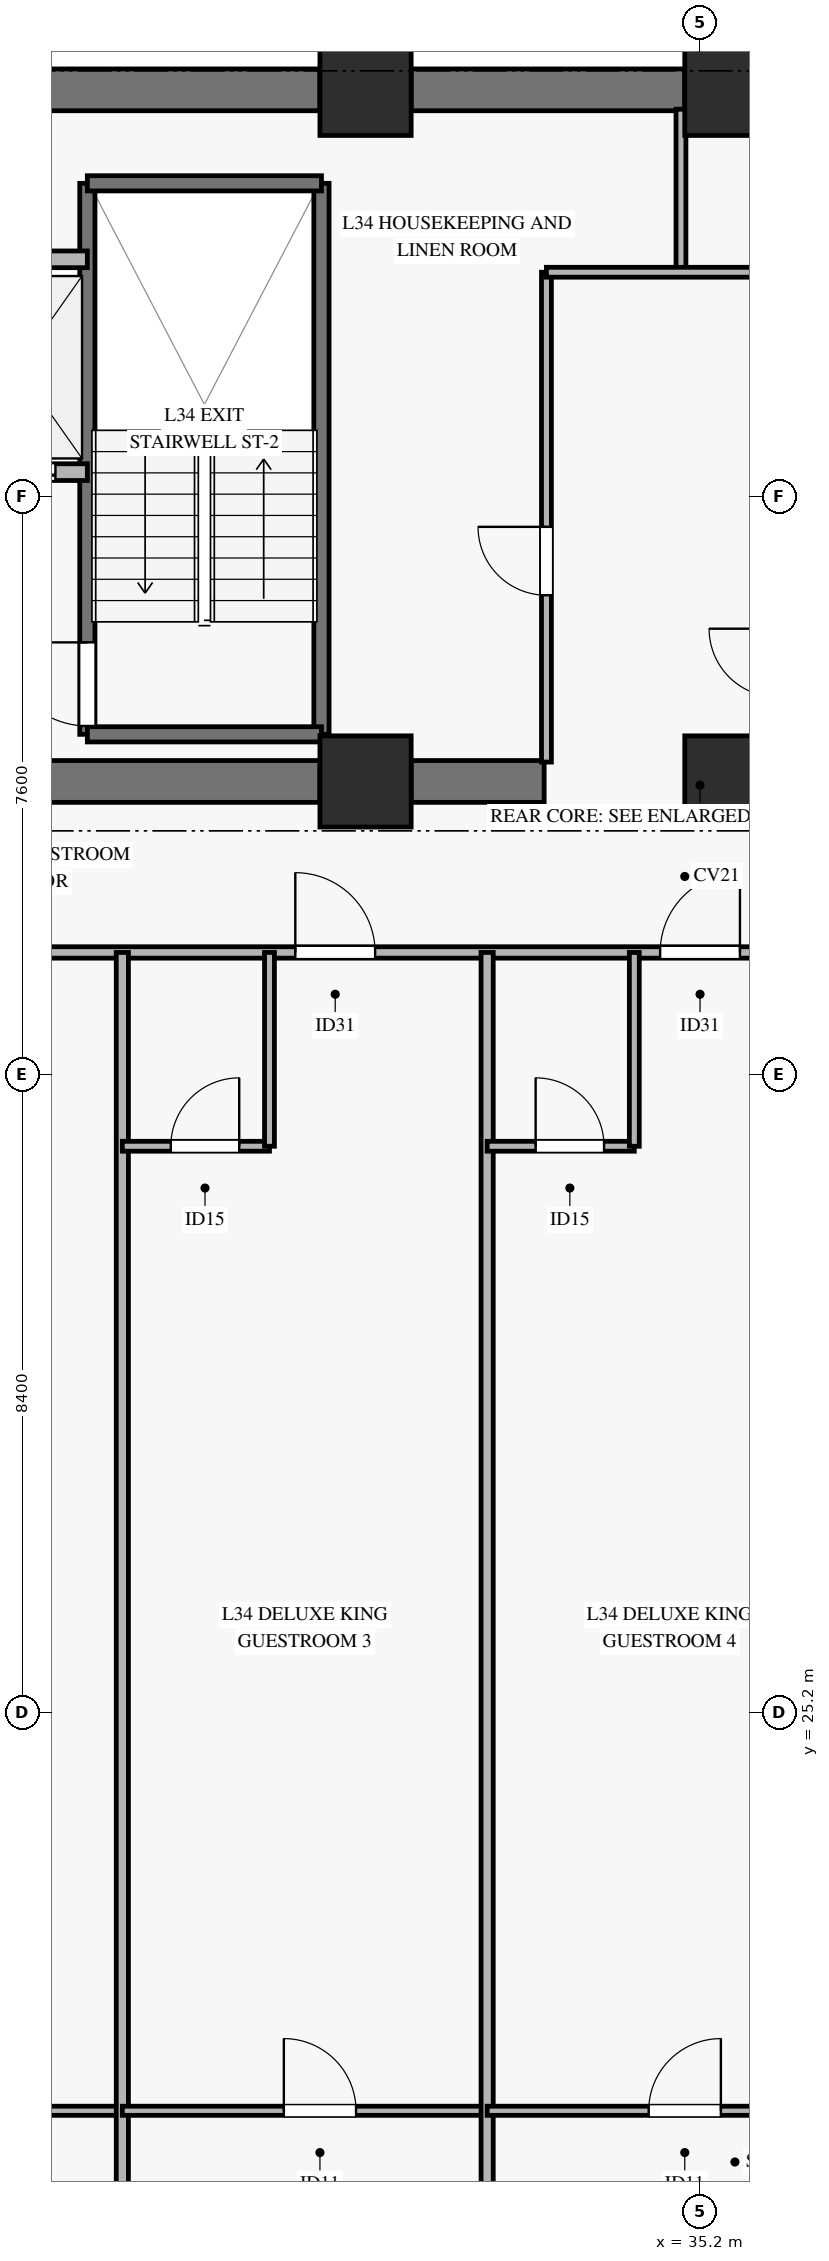
"""IFC4 building model, lengths in metres.
Left out: names, types, materials, properties, quantities, classifications, styles, units other than length and angle.
Written with IfcOpenShell. Run it as: python <this file> out.ifc"""

import sys

from ifc_helpers import new_model, si_unit, direction, frame, frame_2d, origin, origin_2d, place, context, subcontext, project, spatial, rectangle, extrude, source, transform, mapped, element, fill, save


model = new_model("IFC4")
c1 = context("Model", 3, precision=1e-05, world=origin(), true_north=direction((0.0, 1.0)))
c2 = subcontext(c1, "Body", "Model", "MODEL_VIEW")
j1 = project(units=[si_unit("LENGTHUNIT", "METRE"), si_unit("PLANEANGLEUNIT", "RADIAN")], contexts=[c1])
p1 = place(None, origin())
s1 = spatial("IfcSite", under=j1, at=p1, CompositionType="ELEMENT")
p2 = place(p1, origin())
s2 = spatial("IfcBuilding", under=s1, at=p2, CompositionType="ELEMENT")
p3 = place(p2, frame((0.0, 0.0, 141.2)))
s3 = spatial("IfcBuildingStorey", under=s2, at=p3, CompositionType="ELEMENT", Elevation=141.2)
m1 = source(origin(), c2, "Body", "SweptSolid", [
    extrude(rectangle(XDim=1.2, YDim=1.2, at=origin_2d()), origin(), (0.0, 0.0, 1.0), 3.22),
])
for number, where, z_axis, x_axis in (
    (1, (30.8, 37.45, 0.0), (0.0, 0.0, 1.0), (1.0, 0.0, 0.0)),
    (2, (30.8, 46.55, 0.0), (0.0, 0.0, 1.0), (1.0, 0.0, 0.0)),
    (3, (35.6, 37.45, 0.0), (0.0, 0.0, 1.0), (1.0, 0.0, 0.0)),
    (4, (35.6, 46.55, 0.0), (0.0, 0.0, 1.0), (1.0, 0.0, 0.0)),
):
    element("IfcColumn", number, at=place(p3, frame(where, z_axis=z_axis, x_axis=x_axis)), inside=s3, PredefinedType="PILASTER", context=c2, shape_type="MappedRepresentation", body=[
        mapped(m1, transform((0.0, 0.0, 0.0), x_axis=(1.0, 0.0, 0.0), y_axis=(0.0, 1.0, 0.0), z_axis=(0.0, 0.0, 1.0), scale=1.0)),
    ])
p4 = place(p3, frame((20.45, 46.55, 0.0), z_axis=(0.0, 0.0, 1.0), x_axis=(1.0, 0.0, 0.0)))
e5 = element("IfcWall", 5, at=p4, inside=s3, PredefinedType="SHEAR", context=c2, shape_type="SweptSolid", body=[
    extrude(rectangle(XDim=9.75, YDim=0.55, at=frame_2d((4.875, 0.0))), origin(), (0.0, 0.0, 1.0), 3.22),
])
p5 = place(p3, frame((31.4, 46.55, 0.0), z_axis=(0.0, 0.0, 1.0), x_axis=(1.0, 0.0, 0.0)))
e6 = element("IfcWall", 6, at=p5, inside=s3, PredefinedType="SHEAR", context=c2, shape_type="SweptSolid", body=[
    extrude(rectangle(XDim=3.6, YDim=0.55, at=frame_2d((1.8, 0.0))), origin(), (0.0, 0.0, 1.0), 3.22),
])
p6 = place(p3, frame((20.45, 37.45, 0.0), z_axis=(0.0, 0.0, 1.0), x_axis=(1.0, 0.0, 0.0)))
e7 = element("IfcWall", 7, at=p6, inside=s3, PredefinedType="SHEAR", context=c2, shape_type="SweptSolid", body=[
    extrude(rectangle(XDim=9.75, YDim=0.55, at=frame_2d((4.875, 0.0))), origin(), (0.0, 0.0, 1.0), 3.22),
])
p7 = place(p6, frame((4.1, 0.0, 0.0)))
e8 = element("IfcOpeningElement", 8, at=p7, cuts=e7, PredefinedType="OPENING", context=c2, shape_type="SweptSolid", body=[
    extrude(rectangle(XDim=1.2, YDim=2.15, at=frame_2d((0.6, 1.075))), frame((0.0, 0.285, 0.0), z_axis=(0.0, -1.0, 0.0), x_axis=(1.0, 0.0, 0.0)), (0.0, 0.0, 1.0), 0.57),
])
p8 = place(p3, frame((31.4, 37.45, 0.0), z_axis=(0.0, 0.0, 1.0), x_axis=(1.0, 0.0, 0.0)))
e9 = element("IfcWall", 9, at=p8, inside=s3, PredefinedType="SHEAR", context=c2, shape_type="SweptSolid", body=[
    extrude(rectangle(XDim=1.75, YDim=0.55, at=frame_2d((0.875, 0.0))), origin(), (0.0, 0.0, 1.0), 3.22),
])
p9 = place(p3, frame((27.14, 38.07, 0.0), z_axis=(0.0, 0.0, 1.0), x_axis=(0.0, 1.0, 0.0)))
e10 = element("IfcWall", 10, at=p9, inside=s3, PredefinedType="SOLIDWALL", context=c2, shape_type="SweptSolid", body=[
    extrude(rectangle(XDim=7.25, YDim=0.2, at=frame_2d((3.625, 0.0))), origin(), (0.0, 0.0, 1.0), 3.5),
])
p10 = place(p9, frame((0.11, 0.0, 0.0)))
e11 = element("IfcOpeningElement", 11, at=p10, cuts=e10, PredefinedType="OPENING", context=c2, shape_type="SweptSolid", body=[
    extrude(rectangle(XDim=1.1, YDim=2.15, at=frame_2d((0.55, 1.075))), frame((0.0, 0.11, 0.0), z_axis=(0.0, -1.0, 0.0), x_axis=(1.0, 0.0, 0.0)), (0.0, 0.0, 1.0), 0.22),
])
p11 = place(p3, frame((30.22, 38.07, 0.0), z_axis=(0.0, 0.0, 1.0), x_axis=(0.0, 1.0, 0.0)))
e12 = element("IfcWall", 12, at=p11, inside=s3, PredefinedType="SOLIDWALL", context=c2, shape_type="SweptSolid", body=[
    extrude(rectangle(XDim=7.25, YDim=0.2, at=frame_2d((3.625, 0.0))), origin(), (0.0, 0.0, 1.0), 3.5),
])
for number, where, z_axis, x_axis in (
    (13, (27.14, 45.32, 0.0), (0.0, 0.0, 1.0), (1.0, 0.0, 0.0)),
    (14, (27.14, 38.07, 0.0), (0.0, 0.0, 1.0), (1.0, 0.0, 0.0)),
):
    element("IfcWall", number, at=place(p3, frame(where, z_axis=z_axis, x_axis=x_axis)), inside=s3, PredefinedType="SOLIDWALL", context=c2, shape_type="SweptSolid", body=[
        extrude(rectangle(XDim=3.08, YDim=0.2, at=frame_2d((1.54, 0.0))), origin(), (0.0, 0.0, 1.0), 3.5),
    ])
p12 = place(p3, frame((23.22, 41.52, 0.0), z_axis=(0.0, 0.0, 1.0), x_axis=(1.0, 0.0, 0.0)))
e15 = element("IfcWall", 15, at=p12, inside=s3, PredefinedType="SOLIDWALL", context=c2, shape_type="SweptSolid", body=[
    extrude(rectangle(XDim=3.92, YDim=0.22, at=frame_2d((1.96, 0.0))), origin(), (0.0, 0.0, 1.0), 3.22),
])
p13 = place(p12, frame((0.5, 0.0, 0.0)))
e16 = element("IfcOpeningElement", 16, at=p13, cuts=e15, PredefinedType="OPENING", context=c2, shape_type="SweptSolid", body=[
    extrude(rectangle(XDim=1.1, YDim=2.2, at=frame_2d((0.55, 1.1))), frame((0.0, 0.12, 0.0), z_axis=(0.0, -1.0, 0.0), x_axis=(1.0, 0.0, 0.0)), (0.0, 0.0, 1.0), 0.24),
])
p14 = place(p12, frame((2.4, 0.0, 0.0)))
e17 = element("IfcOpeningElement", 17, at=p14, cuts=e15, PredefinedType="OPENING", context=c2, shape_type="SweptSolid", body=[
    extrude(rectangle(XDim=1.1, YDim=2.2, at=frame_2d((0.55, 1.1))), frame((0.0, 0.12, 0.0), z_axis=(0.0, -1.0, 0.0), x_axis=(1.0, 0.0, 0.0)), (0.0, 0.0, 1.0), 0.24),
])
p15 = place(p3, frame((23.22, 44.32, 0.0), z_axis=(0.0, 0.0, 1.0), x_axis=(1.0, 0.0, 0.0)))
e18 = element("IfcWall", 18, at=p15, inside=s3, PredefinedType="SOLIDWALL", context=c2, shape_type="SweptSolid", body=[
    extrude(rectangle(XDim=3.92, YDim=0.22, at=frame_2d((1.96, 0.0))), origin(), (0.0, 0.0, 1.0), 3.22),
])
p16 = place(p3, frame((33.18, 37.705, 0.0), z_axis=(0.0, 0.0, 1.0), x_axis=(0.0, 1.0, 0.0)))
e19 = element("IfcWall", 19, at=p16, inside=s3, PredefinedType="PARTITIONING", context=c2, shape_type="SweptSolid", body=[
    extrude(rectangle(XDim=6.445, YDim=0.13, at=frame_2d((3.222, 0.0))), origin(), (0.0, 0.0, 1.0), 2.22),
])
p17 = place(p16, frame((2.195, 0.0, 0.0)))
e20 = element("IfcOpeningElement", 20, at=p17, cuts=e19, PredefinedType="OPENING", context=c2, shape_type="SweptSolid", body=[
    extrude(rectangle(XDim=0.9, YDim=2.1, at=frame_2d((0.45, 1.05))), frame((0.0, 0.075, 0.0), z_axis=(0.0, -1.0, 0.0), x_axis=(1.0, 0.0, 0.0)), (0.0, 0.0, 1.0), 0.15),
])
p18 = place(p3, frame((34.95, 44.15, 0.0), z_axis=(0.0, 0.0, 1.0), x_axis=(0.0, 1.0, 0.0)))
e21 = element("IfcWall", 21, at=p18, inside=s3, PredefinedType="PARTITIONING", context=c2, shape_type="SweptSolid", body=[
    extrude(rectangle(XDim=2.145, YDim=0.13, at=frame_2d((1.073, 0.0))), origin(), (0.0, 0.0, 1.0), 3.22),
])
p19 = place(p3, frame((33.18, 44.15, 0.0), z_axis=(0.0, 0.0, 1.0), x_axis=(1.0, 0.0, 0.0)))
e22 = element("IfcWall", 22, at=p19, inside=s3, PredefinedType="PARTITIONING", context=c2, shape_type="SweptSolid", body=[
    extrude(rectangle(XDim=2.97, YDim=0.13, at=frame_2d((1.485, 0.0))), origin(), (0.0, 0.0, 1.0), 2.505),
])
p20 = place(p3, frame((5.214, 35.2, 0.0), z_axis=(0.0, 0.0, 1.0), x_axis=(1.0, 0.0, 0.0)))
e23 = element("IfcWall", 23, at=p20, inside=s3, PredefinedType="PARTITIONING", context=c2, shape_type="SweptSolid", body=[
    extrude(rectangle(XDim=59.972, YDim=0.15, at=frame_2d((29.986, 0.0))), origin(), (0.0, 0.0, 1.0), 2.405),
])
p21 = place(p20, frame((2.77, 0.0, 0.0)))
e24 = element("IfcOpeningElement", 24, at=p21, cuts=e23, PredefinedType="OPENING", context=c2, shape_type="SweptSolid", body=[
    extrude(rectangle(XDim=1.05, YDim=2.15, at=frame_2d((0.525, 1.075))), frame((0.0, 0.085, 0.0), z_axis=(0.0, -1.0, 0.0), x_axis=(1.0, 0.0, 0.0)), (0.0, 0.0, 1.0), 0.17),
])
p22 = place(p20, frame((19.156, 0.0, 0.0)))
e25 = element("IfcOpeningElement", 25, at=p22, cuts=e23, PredefinedType="OPENING", context=c2, shape_type="SweptSolid", body=[
    extrude(rectangle(XDim=1.05, YDim=2.15, at=frame_2d((0.525, 1.075))), frame((0.0, 0.085, 0.0), z_axis=(0.0, -1.0, 0.0), x_axis=(1.0, 0.0, 0.0)), (0.0, 0.0, 1.0), 0.17),
])
p23 = place(p20, frame((24.662, 0.0, 0.0)))
e26 = element("IfcOpeningElement", 26, at=p23, cuts=e23, PredefinedType="OPENING", context=c2, shape_type="SweptSolid", body=[
    extrude(rectangle(XDim=1.05, YDim=2.15, at=frame_2d((0.525, 1.075))), frame((0.0, 0.085, 0.0), z_axis=(0.0, -1.0, 0.0), x_axis=(1.0, 0.0, 0.0)), (0.0, 0.0, 1.0), 0.17),
])
p24 = place(p20, frame((29.462, 0.0, 0.0)))
e27 = element("IfcOpeningElement", 27, at=p24, cuts=e23, PredefinedType="OPENING", context=c2, shape_type="SweptSolid", body=[
    extrude(rectangle(XDim=1.05, YDim=2.15, at=frame_2d((0.525, 1.075))), frame((0.0, 0.085, 0.0), z_axis=(0.0, -1.0, 0.0), x_axis=(1.0, 0.0, 0.0)), (0.0, 0.0, 1.0), 0.17),
])
p25 = place(p20, frame((34.262, 0.0, 0.0)))
e28 = element("IfcOpeningElement", 28, at=p25, cuts=e23, PredefinedType="OPENING", context=c2, shape_type="SweptSolid", body=[
    extrude(rectangle(XDim=1.05, YDim=2.15, at=frame_2d((0.525, 1.075))), frame((0.0, 0.085, 0.0), z_axis=(0.0, -1.0, 0.0), x_axis=(1.0, 0.0, 0.0)), (0.0, 0.0, 1.0), 0.17),
])
p26 = place(p20, frame((38.806, 0.0, 0.0)))
e29 = element("IfcOpeningElement", 29, at=p26, cuts=e23, PredefinedType="OPENING", context=c2, shape_type="SweptSolid", body=[
    extrude(rectangle(XDim=1.05, YDim=2.15, at=frame_2d((0.525, 1.075))), frame((0.0, 0.085, 0.0), z_axis=(0.0, -1.0, 0.0), x_axis=(1.0, 0.0, 0.0)), (0.0, 0.0, 1.0), 0.17),
])
p27 = place(p20, frame((42.956, 0.0, 0.0)))
e30 = element("IfcOpeningElement", 30, at=p27, cuts=e23, PredefinedType="OPENING", context=c2, shape_type="SweptSolid", body=[
    extrude(rectangle(XDim=1.05, YDim=2.15, at=frame_2d((0.525, 1.075))), frame((0.0, 0.085, 0.0), z_axis=(0.0, -1.0, 0.0), x_axis=(1.0, 0.0, 0.0)), (0.0, 0.0, 1.0), 0.17),
])
p28 = place(p3, frame((21.8, 19.959, 0.0), z_axis=(0.0, 0.0, 1.0), x_axis=(1.0, 0.0, 0.0)))
e31 = element("IfcWall", 31, at=p28, inside=s3, PredefinedType="PARTITIONING", context=c2, shape_type="SweptSolid", body=[
    extrude(rectangle(XDim=5.8, YDim=0.12, at=frame_2d((2.9, 0.0))), origin(), (0.0, 0.0, 1.0), 3.22),
])
p29 = place(p28, frame((2.625, 0.0, 0.0)))
e32 = element("IfcOpeningElement", 32, at=p29, cuts=e31, PredefinedType="OPENING", context=c2, shape_type="SweptSolid", body=[
    extrude(rectangle(XDim=0.95, YDim=2.1, at=frame_2d((0.475, 1.05))), frame((0.0, 0.07, 0.0), z_axis=(0.0, -1.0, 0.0), x_axis=(1.0, 0.0, 0.0)), (0.0, 0.0, 1.0), 0.14),
])
p30 = place(p3, frame((27.6, 8.045, 0.0), z_axis=(0.0, 0.0, 1.0), x_axis=(0.0, 1.0, 0.0)))
e33 = element("IfcWall", 33, at=p30, inside=s3, PredefinedType="PARTITIONING", context=c2, shape_type="SweptSolid", body=[
    extrude(rectangle(XDim=27.155, YDim=0.16, at=frame_2d((13.578, 0.0))), origin(), (0.0, 0.0, 1.0), 2.705),
])
p31 = place(p3, frame((27.6, 32.65, 0.0), z_axis=(0.0, 0.0, 1.0), x_axis=(1.0, 0.0, 0.0)))
e34 = element("IfcWall", 34, at=p31, inside=s3, PredefinedType="PARTITIONING", context=c2, shape_type="SweptSolid", body=[
    extrude(rectangle(XDim=1.936, YDim=0.13, at=frame_2d((0.968, 0.0))), origin(), (0.0, 0.0, 1.0), 2.755),
])
p32 = place(p31, frame((0.638, 0.0, 0.0)))
e35 = element("IfcOpeningElement", 35, at=p32, cuts=e34, PredefinedType="OPENING", context=c2, shape_type="SweptSolid", body=[
    extrude(rectangle(XDim=0.9, YDim=2.1, at=frame_2d((0.45, 1.05))), frame((0.0, 0.075, 0.0), z_axis=(0.0, -1.0, 0.0), x_axis=(1.0, 0.0, 0.0)), (0.0, 0.0, 1.0), 0.15),
])
p33 = place(p3, frame((29.536, 32.65, 0.0), z_axis=(0.0, 0.0, 1.0), x_axis=(0.0, 1.0, 0.0)))
e36 = element("IfcWall", 36, at=p33, inside=s3, PredefinedType="PARTITIONING", context=c2, shape_type="SweptSolid", body=[
    extrude(rectangle(XDim=2.55, YDim=0.13, at=frame_2d((1.275, 0.0))), origin(), (0.0, 0.0, 1.0), 3.22),
])
p34 = place(p3, frame((27.6, 19.959, 0.0), z_axis=(0.0, 0.0, 1.0), x_axis=(1.0, 0.0, 0.0)))
e37 = element("IfcWall", 37, at=p34, inside=s3, PredefinedType="PARTITIONING", context=c2, shape_type="SweptSolid", body=[
    extrude(rectangle(XDim=4.8, YDim=0.12, at=frame_2d((2.4, 0.0))), origin(), (0.0, 0.0, 1.0), 2.405),
])
p35 = place(p34, frame((2.125, 0.0, 0.0)))
e38 = element("IfcOpeningElement", 38, at=p35, cuts=e37, PredefinedType="OPENING", context=c2, shape_type="SweptSolid", body=[
    extrude(rectangle(XDim=0.95, YDim=2.1, at=frame_2d((0.475, 1.05))), frame((0.0, 0.07, 0.0), z_axis=(0.0, -1.0, 0.0), x_axis=(1.0, 0.0, 0.0)), (0.0, 0.0, 1.0), 0.14),
])
p36 = place(p3, frame((32.4, 8.045, 0.0), z_axis=(0.0, 0.0, 1.0), x_axis=(0.0, 1.0, 0.0)))
e39 = element("IfcWall", 39, at=p36, inside=s3, PredefinedType="PARTITIONING", context=c2, shape_type="SweptSolid", body=[
    extrude(rectangle(XDim=27.155, YDim=0.16, at=frame_2d((13.578, 0.0))), origin(), (0.0, 0.0, 1.0), 2.705),
])
p37 = place(p3, frame((32.4, 32.65, 0.0), z_axis=(0.0, 0.0, 1.0), x_axis=(1.0, 0.0, 0.0)))
e40 = element("IfcWall", 40, at=p37, inside=s3, PredefinedType="PARTITIONING", context=c2, shape_type="SweptSolid", body=[
    extrude(rectangle(XDim=1.936, YDim=0.13, at=frame_2d((0.968, 0.0))), origin(), (0.0, 0.0, 1.0), 2.755),
])
p38 = place(p37, frame((0.638, 0.0, 0.0)))
e41 = element("IfcOpeningElement", 41, at=p38, cuts=e40, PredefinedType="OPENING", context=c2, shape_type="SweptSolid", body=[
    extrude(rectangle(XDim=0.9, YDim=2.1, at=frame_2d((0.45, 1.05))), frame((0.0, 0.075, 0.0), z_axis=(0.0, -1.0, 0.0), x_axis=(1.0, 0.0, 0.0)), (0.0, 0.0, 1.0), 0.15),
])
p39 = place(p3, frame((34.336, 32.65, 0.0), z_axis=(0.0, 0.0, 1.0), x_axis=(0.0, 1.0, 0.0)))
e42 = element("IfcWall", 42, at=p39, inside=s3, PredefinedType="PARTITIONING", context=c2, shape_type="SweptSolid", body=[
    extrude(rectangle(XDim=2.55, YDim=0.13, at=frame_2d((1.275, 0.0))), origin(), (0.0, 0.0, 1.0), 3.22),
])
p40 = place(p3, frame((32.4, 19.959, 0.0), z_axis=(0.0, 0.0, 1.0), x_axis=(1.0, 0.0, 0.0)))
e43 = element("IfcWall", 43, at=p40, inside=s3, PredefinedType="PARTITIONING", context=c2, shape_type="SweptSolid", body=[
    extrude(rectangle(XDim=4.8, YDim=0.12, at=frame_2d((2.4, 0.0))), origin(), (0.0, 0.0, 1.0), 3.22),
])
p41 = place(p40, frame((2.125, 0.0, 0.0)))
e44 = element("IfcOpeningElement", 44, at=p41, cuts=e43, PredefinedType="OPENING", context=c2, shape_type="SweptSolid", body=[
    extrude(rectangle(XDim=0.95, YDim=2.1, at=frame_2d((0.475, 1.05))), frame((0.0, 0.07, 0.0), z_axis=(0.0, -1.0, 0.0), x_axis=(1.0, 0.0, 0.0)), (0.0, 0.0, 1.0), 0.14),
])
m2 = source(origin(), c2, "Body", "SweptSolid", [
    extrude(rectangle(XDim=1.1, YDim=2.15, at=frame_2d((0.55, 1.075))), frame((0.0, 0.025, 0.0), z_axis=(0.0, -1.0, 0.0), x_axis=(1.0, 0.0, 0.0)), (0.0, 0.0, 1.0), 0.05),
])
p42 = place(p10, origin())
e45 = element("IfcDoor", 45, at=p42, inside=s3, OperationType="SINGLE_SWING_RIGHT", PredefinedType="DOOR", context=c2, shape_type="MappedRepresentation", body=[
    mapped(m2, transform((0.0, 0.0, 0.0), x_axis=(1.0, 0.0, 0.0), y_axis=(0.0, 1.0, 0.0), z_axis=(0.0, 0.0, 1.0), scale=1.0)),
])
fill(e11, e45)
m3 = source(origin(), c2, "Body", "SweptSolid", [
    extrude(rectangle(XDim=1.1, YDim=2.2, at=frame_2d((0.55, 1.1))), frame((0.0, 0.025, 0.0), z_axis=(0.0, -1.0, 0.0), x_axis=(1.0, 0.0, 0.0)), (0.0, 0.0, 1.0), 0.05),
])
p43 = place(p14, origin())
e46 = element("IfcDoor", 46, at=p43, inside=s3, OperationType="SLIDING_TO_LEFT", PredefinedType="DOOR", context=c2, shape_type="MappedRepresentation", body=[
    mapped(m3, transform((0.0, 0.0, 0.0), x_axis=(1.0, 0.0, 0.0), y_axis=(0.0, 1.0, 0.0), z_axis=(0.0, 0.0, 1.0), scale=1.0)),
])
fill(e17, e46)
m4 = source(origin(), c2, "Body", "SweptSolid", [
    extrude(rectangle(XDim=0.9, YDim=2.1, at=frame_2d((0.45, 1.05))), frame((0.0, 0.025, 0.0), z_axis=(0.0, -1.0, 0.0), x_axis=(1.0, 0.0, 0.0)), (0.0, 0.0, 1.0), 0.05),
])
p44 = place(p17, origin())
e47 = element("IfcDoor", 47, at=p44, inside=s3, OperationType="SINGLE_SWING_RIGHT", PredefinedType="DOOR", context=c2, shape_type="MappedRepresentation", body=[
    mapped(m4, transform((0.0, 0.0, 0.0), x_axis=(1.0, 0.0, 0.0), y_axis=(0.0, 1.0, 0.0), z_axis=(0.0, 0.0, 1.0), scale=1.0)),
])
fill(e20, e47)
m5 = source(origin(), c2, "Body", "SweptSolid", [
    extrude(rectangle(XDim=1.05, YDim=2.15, at=frame_2d((0.525, 1.075))), frame((0.0, 0.025, 0.0), z_axis=(0.0, -1.0, 0.0), x_axis=(1.0, 0.0, 0.0)), (0.0, 0.0, 1.0), 0.05),
])
p45 = place(p23, origin())
e48 = element("IfcDoor", 48, at=p45, inside=s3, OperationType="SINGLE_SWING_LEFT", PredefinedType="DOOR", context=c2, shape_type="MappedRepresentation", body=[
    mapped(m5, transform((0.0, 0.0, 0.0), x_axis=(1.0, 0.0, 0.0), y_axis=(0.0, 1.0, 0.0), z_axis=(0.0, 0.0, 1.0), scale=1.0)),
])
fill(e26, e48)
p46 = place(p32, origin())
e49 = element("IfcDoor", 49, at=p46, inside=s3, OperationType="SINGLE_SWING_RIGHT", PredefinedType="DOOR", context=c2, shape_type="MappedRepresentation", body=[
    mapped(m4, transform((0.0, 0.0, 0.0), x_axis=(1.0, 0.0, 0.0), y_axis=(0.0, 1.0, 0.0), z_axis=(0.0, 0.0, 1.0), scale=1.0)),
])
fill(e35, e49)
m6 = source(origin(), c2, "Body", "SweptSolid", [
    extrude(rectangle(XDim=0.95, YDim=2.1, at=frame_2d((0.475, 1.05))), frame((0.0, 0.025, 0.0), z_axis=(0.0, -1.0, 0.0), x_axis=(1.0, 0.0, 0.0)), (0.0, 0.0, 1.0), 0.05),
])
p47 = place(p35, origin())
e50 = element("IfcDoor", 50, at=p47, inside=s3, OperationType="SINGLE_SWING_LEFT", PredefinedType="DOOR", context=c2, shape_type="MappedRepresentation", body=[
    mapped(m6, transform((0.0, 0.0, 0.0), x_axis=(1.0, 0.0, 0.0), y_axis=(0.0, 1.0, 0.0), z_axis=(0.0, 0.0, 1.0), scale=1.0)),
])
fill(e38, e50)
p48 = place(p24, origin())
e51 = element("IfcDoor", 51, at=p48, inside=s3, OperationType="SINGLE_SWING_RIGHT", PredefinedType="DOOR", context=c2, shape_type="MappedRepresentation", body=[
    mapped(m5, transform((0.0, 0.0, 0.0), x_axis=(1.0, 0.0, 0.0), y_axis=(0.0, 1.0, 0.0), z_axis=(0.0, 0.0, 1.0), scale=1.0)),
])
fill(e27, e51)
p49 = place(p38, origin())
e52 = element("IfcDoor", 52, at=p49, inside=s3, OperationType="SINGLE_SWING_LEFT", PredefinedType="DOOR", context=c2, shape_type="MappedRepresentation", body=[
    mapped(m4, transform((0.0, 0.0, 0.0), x_axis=(1.0, 0.0, 0.0), y_axis=(0.0, 1.0, 0.0), z_axis=(0.0, 0.0, 1.0), scale=1.0)),
])
fill(e41, e52)
p50 = place(p41, origin())
e53 = element("IfcDoor", 53, at=p50, inside=s3, OperationType="SINGLE_SWING_RIGHT", PredefinedType="DOOR", context=c2, shape_type="MappedRepresentation", body=[
    mapped(m6, transform((0.0, 0.0, 0.0), x_axis=(1.0, 0.0, 0.0), y_axis=(0.0, 1.0, 0.0), z_axis=(0.0, 0.0, 1.0), scale=1.0)),
])
fill(e44, e53)
save(model, sys.argv[1])
